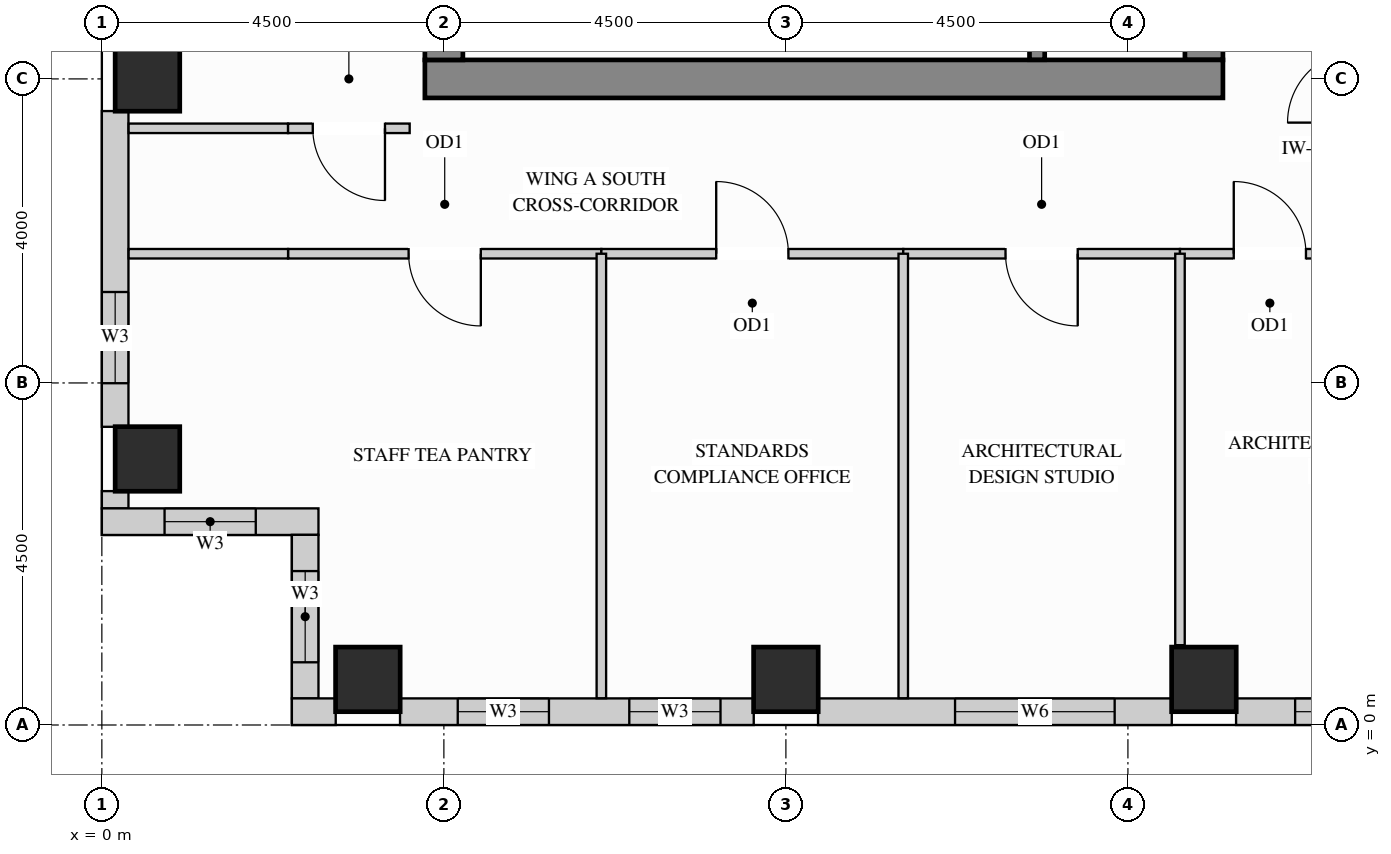
"""IFC4 building model, lengths in metres.
Left out: names, types, materials, properties, quantities, classifications, styles, units other than length and angle.
Written with IfcOpenShell. Run it as: python <this file> out.ifc"""

import sys

from ifc_helpers import new_model, si_unit, direction, frame, frame_2d, origin, origin_2d, place, context, subcontext, project, spatial, rectangle, extrude, source, transform, mapped, element, fill, save


model = new_model("IFC4")
c1 = context("Model", 3, precision=1e-05, world=origin(), true_north=direction((0.0, 1.0)))
c2 = subcontext(c1, "Body", "Model", "MODEL_VIEW")
j1 = project(units=[si_unit("LENGTHUNIT", "METRE"), si_unit("PLANEANGLEUNIT", "RADIAN")], contexts=[c1])
p1 = place(None, origin())
s1 = spatial("IfcSite", under=j1, at=p1, CompositionType="ELEMENT")
p2 = place(p1, origin())
s2 = spatial("IfcBuilding", under=s1, at=p2, CompositionType="ELEMENT")
p3 = place(p2, frame((0.0, 0.0, 241.2)))
s3 = spatial("IfcBuildingStorey", under=s2, at=p3, CompositionType="ELEMENT", Elevation=241.2)
m1 = source(origin(), c2, "Body", "SweptSolid", [
    extrude(rectangle(XDim=0.85, YDim=0.85, at=origin_2d()), origin(), (0.0, 0.0, 1.0), 3.4),
])
for number, where, z_axis, x_axis in (
    (1, (14.5, 0.6, 0.0), (0.0, 0.0, 1.0), (1.0, 0.0, 0.0)),
    (2, (3.5, 0.6, 0.0), (0.0, 0.0, 1.0), (1.0, 0.0, 0.0)),
    (3, (9.0, 0.6, 0.0), (0.0, 0.0, 1.0), (1.0, 0.0, 0.0)),
    (4, (0.6, 3.5, 0.0), (0.0, 0.0, 1.0), (1.0, 0.0, 0.0)),
    (5, (0.6, 8.5, 0.0), (0.0, 0.0, 1.0), (1.0, 0.0, 0.0)),
):
    element("IfcColumn", number, at=place(p3, frame(where, z_axis=z_axis, x_axis=x_axis)), inside=s3, PredefinedType="COLUMN", context=c2, shape_type="MappedRepresentation", body=[
        mapped(m1, transform((0.0, 0.0, 0.0), x_axis=(1.0, 0.0, 0.0), y_axis=(0.0, 1.0, 0.0), z_axis=(0.0, 0.0, 1.0))),
    ])
m2 = source(origin(), c2, "Body", "SweptSolid", [
    extrude(rectangle(XDim=10.07, YDim=0.5, at=frame_2d((5.035, 0.0))), origin(), (0.0, 0.0, 1.0), 3.4),
])
p4 = place(p3, frame((14.5, 8.75, 0.0), z_axis=(0.0, 0.0, 1.0), x_axis=(0.0, 1.0, 0.0)))
e6 = element("IfcWall", 6, at=p4, inside=s3, PredefinedType="SHEAR", context=c2, shape_type="MappedRepresentation", body=[
    mapped(m2, transform((0.0, 0.0, 0.0), x_axis=(1.0, 0.0, 0.0), y_axis=(0.0, 1.0, 0.0), z_axis=(0.0, 0.0, 1.0))),
])
m3 = source(origin(), c2, "Body", "SweptSolid", [
    extrude(rectangle(XDim=10.5, YDim=0.5, at=frame_2d((5.25, 0.0))), origin(), (0.0, 0.0, 1.0), 3.4),
])
p5 = place(p3, frame((4.25, 8.5, 0.0), z_axis=(0.0, 0.0, 1.0), x_axis=(1.0, 0.0, 0.0)))
e7 = element("IfcWall", 7, at=p5, inside=s3, PredefinedType="SHEAR", context=c2, shape_type="MappedRepresentation", body=[
    mapped(m3, transform((0.0, 0.0, 0.0), x_axis=(1.0, 0.0, 0.0), y_axis=(0.0, 1.0, 0.0), z_axis=(0.0, 0.0, 1.0))),
])
m4 = source(origin(), c2, "Body", "SweptSolid", [
    extrude(rectangle(XDim=20.5, YDim=0.5, at=frame_2d((10.25, 0.0))), origin(), (0.0, 0.0, 1.0), 3.4),
])
p6 = place(p3, frame((4.5, 8.75, 0.0), z_axis=(0.0, 0.0, 1.0), x_axis=(0.0, 1.0, 0.0)))
e8 = element("IfcWall", 8, at=p6, inside=s3, PredefinedType="SHEAR", context=c2, shape_type="MappedRepresentation", body=[
    mapped(m4, transform((0.0, 0.0, 0.0), x_axis=(1.0, 0.0, 0.0), y_axis=(0.0, 1.0, 0.0), z_axis=(0.0, 0.0, 1.0))),
])
p7 = place(p3, frame((0.175, 8.077, 0.0), z_axis=(0.0, 0.0, 1.0), x_axis=(0.0, -1.0, 0.0)))
e9 = element("IfcWall", 9, at=p7, inside=s3, PredefinedType="SOLIDWALL", context=c2, shape_type="SweptSolid", body=[
    extrude(rectangle(XDim=4.154, YDim=0.35, at=frame_2d((2.077, 0.0))), origin(), (0.0, 0.0, 1.0), 3.385),
])
p8 = place(p7, frame((2.381, 0.0, 0.78)))
e10 = element("IfcOpeningElement", 10, at=p8, cuts=e9, PredefinedType="OPENING", context=c2, shape_type="SweptSolid", body=[
    extrude(rectangle(XDim=1.2, YDim=2.25, at=frame_2d((0.6, 1.125))), frame((0.0, 0.185, 0.0), z_axis=(0.0, -1.0, 0.0), x_axis=(1.0, 0.0, 0.0)), (0.0, 0.0, 1.0), 0.37),
])
m5 = source(origin(), c2, "Body", "SweptSolid", [
    extrude(rectangle(XDim=0.229, YDim=0.35, at=frame_2d((0.115, 0.0))), origin(), (0.0, 0.0, 1.0), 3.385),
])
p9 = place(p3, frame((0.175, 3.077, 0.0), z_axis=(0.0, 0.0, 1.0), x_axis=(0.0, -1.0, 0.0)))
e11 = element("IfcWall", 11, at=p9, inside=s3, PredefinedType="SOLIDWALL", context=c2, shape_type="MappedRepresentation", body=[
    mapped(m5, transform((0.0, 0.0, 0.0), x_axis=(1.0, 0.0, 0.0), y_axis=(0.0, 1.0, 0.0), z_axis=(0.0, 0.0, 1.0))),
])
p10 = place(p3, frame((0.0, 2.675, 0.0), z_axis=(0.0, 0.0, 1.0), x_axis=(1.0, 0.0, 0.0)))
e12 = element("IfcWall", 12, at=p10, inside=s3, PredefinedType="SOLIDWALL", context=c2, shape_type="SweptSolid", body=[
    extrude(rectangle(XDim=2.85, YDim=0.35, at=frame_2d((1.425, 0.0))), origin(), (0.0, 0.0, 1.0), 3.385),
])
p11 = place(p10, frame((0.825, 0.0, 0.78)))
e13 = element("IfcOpeningElement", 13, at=p11, cuts=e12, PredefinedType="OPENING", context=c2, shape_type="SweptSolid", body=[
    extrude(rectangle(XDim=1.2, YDim=2.25, at=frame_2d((0.6, 1.125))), frame((0.0, 0.185, 0.0), z_axis=(0.0, -1.0, 0.0), x_axis=(1.0, 0.0, 0.0)), (0.0, 0.0, 1.0), 0.37),
])
p12 = place(p3, frame((2.675, 2.502, 0.0), z_axis=(0.0, 0.0, 1.0), x_axis=(0.0, -1.0, 0.0)))
e14 = element("IfcWall", 14, at=p12, inside=s3, PredefinedType="SOLIDWALL", context=c2, shape_type="SweptSolid", body=[
    extrude(rectangle(XDim=2.154, YDim=0.35, at=frame_2d((1.077, 0.0))), origin(), (0.0, 0.0, 1.0), 3.385),
])
p13 = place(p12, frame((0.477, 0.0, 0.78)))
e15 = element("IfcOpeningElement", 15, at=p13, cuts=e14, PredefinedType="OPENING", context=c2, shape_type="SweptSolid", body=[
    extrude(rectangle(XDim=1.2, YDim=2.25, at=frame_2d((0.6, 1.125))), frame((0.0, 0.185, 0.0), z_axis=(0.0, -1.0, 0.0), x_axis=(1.0, 0.0, 0.0)), (0.0, 0.0, 1.0), 0.37),
])
m6 = source(origin(), c2, "Body", "SweptSolid", [
    extrude(rectangle(XDim=0.577, YDim=0.35, at=frame_2d((0.289, 0.0))), origin(), (0.0, 0.0, 1.0), 3.385),
])
p14 = place(p3, frame((2.5, 0.175, 0.0), z_axis=(0.0, 0.0, 1.0), x_axis=(1.0, 0.0, 0.0)))
e16 = element("IfcWall", 16, at=p14, inside=s3, PredefinedType="SOLIDWALL", context=c2, shape_type="MappedRepresentation", body=[
    mapped(m6, transform((0.0, 0.0, 0.0), x_axis=(1.0, 0.0, 0.0), y_axis=(0.0, 1.0, 0.0), z_axis=(0.0, 0.0, 1.0))),
])
p15 = place(p3, frame((3.923, 0.175, 0.0), z_axis=(0.0, 0.0, 1.0), x_axis=(1.0, 0.0, 0.0)))
e17 = element("IfcWall", 17, at=p15, inside=s3, PredefinedType="SOLIDWALL", context=c2, shape_type="SweptSolid", body=[
    extrude(rectangle(XDim=4.654, YDim=0.35, at=frame_2d((2.327, 0.0))), origin(), (0.0, 0.0, 1.0), 3.385),
])
p16 = place(p15, frame((0.76, 0.0, 0.78)))
e18 = element("IfcOpeningElement", 18, at=p16, cuts=e17, PredefinedType="OPENING", context=c2, shape_type="SweptSolid", body=[
    extrude(rectangle(XDim=1.2, YDim=2.25, at=frame_2d((0.6, 1.125))), frame((0.0, 0.185, 0.0), z_axis=(0.0, -1.0, 0.0), x_axis=(1.0, 0.0, 0.0)), (0.0, 0.0, 1.0), 0.37),
])
p17 = place(p15, frame((3.017, 0.0, 0.78)))
e19 = element("IfcOpeningElement", 19, at=p17, cuts=e17, PredefinedType="OPENING", context=c2, shape_type="SweptSolid", body=[
    extrude(rectangle(XDim=1.2, YDim=2.25, at=frame_2d((0.6, 1.125))), frame((0.0, 0.185, 0.0), z_axis=(0.0, -1.0, 0.0), x_axis=(1.0, 0.0, 0.0)), (0.0, 0.0, 1.0), 0.37),
])
p18 = place(p3, frame((9.423, 0.175, 0.0), z_axis=(0.0, 0.0, 1.0), x_axis=(1.0, 0.0, 0.0)))
e20 = element("IfcWall", 20, at=p18, inside=s3, PredefinedType="SOLIDWALL", context=c2, shape_type="SweptSolid", body=[
    extrude(rectangle(XDim=4.654, YDim=0.35, at=frame_2d((2.327, 0.0))), origin(), (0.0, 0.0, 1.0), 3.385),
])
p19 = place(p18, frame((1.802, 0.0, 0.78)))
e21 = element("IfcOpeningElement", 21, at=p19, cuts=e20, PredefinedType="OPENING", context=c2, shape_type="SweptSolid", body=[
    extrude(rectangle(XDim=2.1, YDim=2.25, at=frame_2d((1.05, 1.125))), frame((0.0, 0.185, 0.0), z_axis=(0.0, -1.0, 0.0), x_axis=(1.0, 0.0, 0.0)), (0.0, 0.0, 1.0), 0.37),
])
p20 = place(p3, frame((14.923, 0.175, 0.0), z_axis=(0.0, 0.0, 1.0), x_axis=(1.0, 0.0, 0.0)))
e22 = element("IfcWall", 22, at=p20, inside=s3, PredefinedType="SOLIDWALL", context=c2, shape_type="SweptSolid", body=[
    extrude(rectangle(XDim=3.654, YDim=0.35, at=frame_2d((1.827, 0.0))), origin(), (0.0, 0.0, 1.0), 3.385),
])
p21 = place(p20, frame((0.777, 0.0, 0.78)))
e23 = element("IfcOpeningElement", 23, at=p21, cuts=e22, PredefinedType="OPENING", context=c2, shape_type="SweptSolid", body=[
    extrude(rectangle(XDim=2.1, YDim=2.25, at=frame_2d((1.05, 1.125))), frame((0.0, 0.185, 0.0), z_axis=(0.0, -1.0, 0.0), x_axis=(1.0, 0.0, 0.0)), (0.0, 0.0, 1.0), 0.37),
])
m7 = source(origin(), c2, "Body", "SweptSolid", [
    extrude(rectangle(XDim=2.098, YDim=0.125, at=frame_2d((1.049, 0.0))), origin(), (0.0, 0.0, 1.0), 3.385),
])
p22 = place(p3, frame((0.352, 7.85, 0.0), z_axis=(0.0, 0.0, 1.0), x_axis=(1.0, 0.0, 0.0)))
e24 = element("IfcWall", 24, at=p22, inside=s3, PredefinedType="PARTITIONING", context=c2, shape_type="MappedRepresentation", body=[
    mapped(m7, transform((0.0, 0.0, 0.0), x_axis=(1.0, 0.0, 0.0), y_axis=(0.0, 1.0, 0.0), z_axis=(0.0, 0.0, 1.0))),
])
p23 = place(p3, frame((2.45, 7.85, 0.0), z_axis=(0.0, 0.0, 1.0), x_axis=(1.0, 0.0, 0.0)))
e25 = element("IfcWall", 25, at=p23, inside=s3, PredefinedType="PARTITIONING", context=c2, shape_type="SweptSolid", body=[
    extrude(rectangle(XDim=1.6, YDim=0.125, at=frame_2d((0.8, 0.0))), origin(), (0.0, 0.0, 1.0), 3.385),
])
p24 = place(p23, frame((0.325, 0.0, 0.0)))
e26 = element("IfcOpeningElement", 26, at=p24, cuts=e25, PredefinedType="OPENING", context=c2, shape_type="SweptSolid", body=[
    extrude(rectangle(XDim=0.95, YDim=2.15, at=frame_2d((0.475, 1.075))), frame((0.0, 0.073, 0.0), z_axis=(0.0, -1.0, 0.0), x_axis=(1.0, 0.0, 0.0)), (0.0, 0.0, 1.0), 0.145),
])
p25 = place(p3, frame((2.45, 6.2, 0.0), z_axis=(0.0, 0.0, 1.0), x_axis=(1.0, 0.0, 0.0)))
e27 = element("IfcWall", 27, at=p25, inside=s3, PredefinedType="PARTITIONING", context=c2, shape_type="SweptSolid", body=[
    extrude(rectangle(XDim=4.122, YDim=0.125, at=frame_2d((2.061, 0.0))), origin(), (0.0, 0.0, 1.0), 2.848),
])
p26 = place(p25, frame((1.586, 0.0, 0.0)))
e28 = element("IfcOpeningElement", 28, at=p26, cuts=e27, PredefinedType="OPENING", context=c2, shape_type="SweptSolid", body=[
    extrude(rectangle(XDim=0.95, YDim=2.15, at=frame_2d((0.475, 1.075))), frame((0.0, 0.073, 0.0), z_axis=(0.0, -1.0, 0.0), x_axis=(1.0, 0.0, 0.0)), (0.0, 0.0, 1.0), 0.145),
])
p27 = place(p3, frame((6.572, 6.2, 0.0), z_axis=(0.0, 0.0, 1.0), x_axis=(1.0, 0.0, 0.0)))
e29 = element("IfcWall", 29, at=p27, inside=s3, PredefinedType="PARTITIONING", context=c2, shape_type="SweptSolid", body=[
    extrude(rectangle(XDim=3.972, YDim=0.125, at=frame_2d((1.986, 0.0))), origin(), (0.0, 0.0, 1.0), 2.848),
])
p28 = place(p27, frame((1.511, 0.0, 0.0)))
e30 = element("IfcOpeningElement", 30, at=p28, cuts=e29, PredefinedType="OPENING", context=c2, shape_type="SweptSolid", body=[
    extrude(rectangle(XDim=0.95, YDim=2.15, at=frame_2d((0.475, 1.075))), frame((0.0, 0.073, 0.0), z_axis=(0.0, -1.0, 0.0), x_axis=(1.0, 0.0, 0.0)), (0.0, 0.0, 1.0), 0.145),
])
p29 = place(p3, frame((10.544, 6.2, 0.0), z_axis=(0.0, 0.0, 1.0), x_axis=(1.0, 0.0, 0.0)))
e31 = element("IfcWall", 31, at=p29, inside=s3, PredefinedType="PARTITIONING", context=c2, shape_type="SweptSolid", body=[
    extrude(rectangle(XDim=3.641, YDim=0.125, at=frame_2d((1.821, 0.0))), origin(), (0.0, 0.0, 1.0), 2.848),
])
p30 = place(p29, frame((1.345, 0.0, 0.0)))
e32 = element("IfcOpeningElement", 32, at=p30, cuts=e31, PredefinedType="OPENING", context=c2, shape_type="SweptSolid", body=[
    extrude(rectangle(XDim=0.95, YDim=2.15, at=frame_2d((0.475, 1.075))), frame((0.0, 0.073, 0.0), z_axis=(0.0, -1.0, 0.0), x_axis=(1.0, 0.0, 0.0)), (0.0, 0.0, 1.0), 0.145),
])
p31 = place(p3, frame((14.185, 6.2, 0.0), z_axis=(0.0, 0.0, 1.0), x_axis=(1.0, 0.0, 0.0)))
e33 = element("IfcWall", 33, at=p31, inside=s3, PredefinedType="PARTITIONING", context=c2, shape_type="SweptSolid", body=[
    extrude(rectangle(XDim=2.365, YDim=0.125, at=frame_2d((1.183, 0.0))), origin(), (0.0, 0.0, 1.0), 2.848),
])
p32 = place(p31, frame((0.708, 0.0, 0.0)))
e34 = element("IfcOpeningElement", 34, at=p32, cuts=e33, PredefinedType="OPENING", context=c2, shape_type="SweptSolid", body=[
    extrude(rectangle(XDim=0.95, YDim=2.15, at=frame_2d((0.475, 1.075))), frame((0.0, 0.073, 0.0), z_axis=(0.0, -1.0, 0.0), x_axis=(1.0, 0.0, 0.0)), (0.0, 0.0, 1.0), 0.145),
])
m8 = source(origin(), c2, "Body", "SweptSolid", [
    extrude(rectangle(XDim=2.098, YDim=0.125, at=frame_2d((1.049, 0.0))), origin(), (0.0, 0.0, 1.0), 2.848),
])
p33 = place(p3, frame((0.352, 6.2, 0.0), z_axis=(0.0, 0.0, 1.0), x_axis=(1.0, 0.0, 0.0)))
e35 = element("IfcWall", 35, at=p33, inside=s3, PredefinedType="PARTITIONING", context=c2, shape_type="MappedRepresentation", body=[
    mapped(m8, transform((0.0, 0.0, 0.0), x_axis=(1.0, 0.0, 0.0), y_axis=(0.0, 1.0, 0.0), z_axis=(0.0, 0.0, 1.0))),
])
m9 = source(origin(), c2, "Body", "SweptSolid", [
    extrude(rectangle(XDim=5.848, YDim=0.125, at=frame_2d((2.924, 0.0))), origin(), (0.0, 0.0, 1.0), 3.385),
])
for number, where, z_axis, x_axis in (
    (36, (6.572, 0.352, 0.0), (0.0, 0.0, 1.0), (0.0, 1.0, 0.0)),
    (37, (10.544, 0.352, 0.0), (0.0, 0.0, 1.0), (0.0, 1.0, 0.0)),
):
    element("IfcWall", number, at=place(p3, frame(where, z_axis=z_axis, x_axis=x_axis)), inside=s3, PredefinedType="PARTITIONING", context=c2, shape_type="MappedRepresentation", body=[
        mapped(m9, transform((0.0, 0.0, 0.0), x_axis=(1.0, 0.0, 0.0), y_axis=(0.0, 1.0, 0.0), z_axis=(0.0, 0.0, 1.0))),
    ])
m10 = source(origin(), c2, "Body", "SweptSolid", [
    extrude(rectangle(XDim=5.15, YDim=0.125, at=frame_2d((2.575, 0.0))), origin(), (0.0, 0.0, 1.0), 3.385),
])
p34 = place(p3, frame((14.185, 1.05, 0.0), z_axis=(0.0, 0.0, 1.0), x_axis=(0.0, 1.0, 0.0)))
e38 = element("IfcWall", 38, at=p34, inside=s3, PredefinedType="PARTITIONING", context=c2, shape_type="MappedRepresentation", body=[
    mapped(m10, transform((0.0, 0.0, 0.0), x_axis=(1.0, 0.0, 0.0), y_axis=(0.0, 1.0, 0.0), z_axis=(0.0, 0.0, 1.0))),
])
m11 = source(origin(), c2, "Body", "SweptSolid", [
    extrude(rectangle(XDim=3.803, YDim=0.2, at=frame_2d((1.901, 0.0))), origin(), (0.0, 0.0, 1.0), 3.4),
])
p35 = place(p3, frame((12.305, 8.752, 0.0), z_axis=(0.0, 0.0, 1.0), x_axis=(0.0, 1.0, 0.0)))
e39 = element("IfcWall", 39, at=p35, inside=s3, PredefinedType="SHEAR", context=c2, shape_type="MappedRepresentation", body=[
    mapped(m11, transform((0.0, 0.0, 0.0), x_axis=(1.0, 0.0, 0.0), y_axis=(0.0, 1.0, 0.0), z_axis=(0.0, 0.0, 1.0))),
])
m12 = source(origin(), c2, "Body", "SweptSolid", [
    extrude(rectangle(XDim=0.95, YDim=2.15, at=frame_2d((0.475, 1.075))), frame((0.0, 0.025, 0.0), z_axis=(0.0, -1.0, 0.0), x_axis=(1.0, 0.0, 0.0)), (0.0, 0.0, 1.0), 0.05),
])
p36 = place(p26, origin())
e40 = element("IfcDoor", 40, at=p36, inside=s3, OperationType="SINGLE_SWING_RIGHT", PredefinedType="DOOR", context=c2, shape_type="MappedRepresentation", body=[
    mapped(m12, transform((0.0, 0.0, 0.0), x_axis=(1.0, 0.0, 0.0), y_axis=(0.0, 1.0, 0.0), z_axis=(0.0, 0.0, 1.0))),
])
fill(e28, e40)
p37 = place(p28, origin())
e41 = element("IfcDoor", 41, at=p37, inside=s3, OperationType="SINGLE_SWING_LEFT", PredefinedType="DOOR", context=c2, shape_type="MappedRepresentation", body=[
    mapped(m12, transform((0.0, 0.0, 0.0), x_axis=(1.0, 0.0, 0.0), y_axis=(0.0, 1.0, 0.0), z_axis=(0.0, 0.0, 1.0))),
])
fill(e30, e41)
p38 = place(p30, origin())
e42 = element("IfcDoor", 42, at=p38, inside=s3, OperationType="SINGLE_SWING_RIGHT", PredefinedType="DOOR", context=c2, shape_type="MappedRepresentation", body=[
    mapped(m12, transform((0.0, 0.0, 0.0), x_axis=(1.0, 0.0, 0.0), y_axis=(0.0, 1.0, 0.0), z_axis=(0.0, 0.0, 1.0))),
])
fill(e32, e42)
p39 = place(p32, origin())
e43 = element("IfcDoor", 43, at=p39, inside=s3, OperationType="SINGLE_SWING_LEFT", PredefinedType="DOOR", context=c2, shape_type="MappedRepresentation", body=[
    mapped(m12, transform((0.0, 0.0, 0.0), x_axis=(1.0, 0.0, 0.0), y_axis=(0.0, 1.0, 0.0), z_axis=(0.0, 0.0, 1.0))),
])
fill(e34, e43)
p40 = place(p24, origin())
e44 = element("IfcDoor", 44, at=p40, inside=s3, OperationType="SINGLE_SWING_RIGHT", PredefinedType="DOOR", context=c2, shape_type="MappedRepresentation", body=[
    mapped(m12, transform((0.0, 0.0, 0.0), x_axis=(1.0, 0.0, 0.0), y_axis=(0.0, 1.0, 0.0), z_axis=(0.0, 0.0, 1.0))),
])
fill(e26, e44)
m13 = source(origin(), c2, "Body", "SweptSolid", [
    extrude(rectangle(XDim=1.2, YDim=2.25, at=frame_2d((0.6, 1.125))), frame((0.0, 0.03, 0.0), z_axis=(0.0, -1.0, 0.0), x_axis=(1.0, 0.0, 0.0)), (0.0, 0.0, 1.0), 0.06),
])
p41 = place(p8, origin())
e45 = element("IfcWindow", 45, at=p41, inside=s3, PartitioningType="SINGLE_PANEL", PredefinedType="WINDOW", context=c2, shape_type="MappedRepresentation", body=[
    mapped(m13, transform((0.0, 0.0, 0.0), x_axis=(1.0, 0.0, 0.0), y_axis=(0.0, 1.0, 0.0), z_axis=(0.0, 0.0, 1.0))),
])
fill(e10, e45)
p42 = place(p11, origin())
e46 = element("IfcWindow", 46, at=p42, inside=s3, PartitioningType="SINGLE_PANEL", PredefinedType="WINDOW", context=c2, shape_type="MappedRepresentation", body=[
    mapped(m13, transform((0.0, 0.0, 0.0), x_axis=(1.0, 0.0, 0.0), y_axis=(0.0, 1.0, 0.0), z_axis=(0.0, 0.0, 1.0))),
])
fill(e13, e46)
p43 = place(p13, origin())
e47 = element("IfcWindow", 47, at=p43, inside=s3, PartitioningType="SINGLE_PANEL", PredefinedType="WINDOW", context=c2, shape_type="MappedRepresentation", body=[
    mapped(m13, transform((0.0, 0.0, 0.0), x_axis=(1.0, 0.0, 0.0), y_axis=(0.0, 1.0, 0.0), z_axis=(0.0, 0.0, 1.0))),
])
fill(e15, e47)
p44 = place(p16, origin())
e48 = element("IfcWindow", 48, at=p44, inside=s3, PartitioningType="SINGLE_PANEL", PredefinedType="WINDOW", context=c2, shape_type="MappedRepresentation", body=[
    mapped(m13, transform((0.0, 0.0, 0.0), x_axis=(1.0, 0.0, 0.0), y_axis=(0.0, 1.0, 0.0), z_axis=(0.0, 0.0, 1.0))),
])
fill(e18, e48)
p45 = place(p17, origin())
e49 = element("IfcWindow", 49, at=p45, inside=s3, PartitioningType="SINGLE_PANEL", PredefinedType="WINDOW", context=c2, shape_type="MappedRepresentation", body=[
    mapped(m13, transform((0.0, 0.0, 0.0), x_axis=(1.0, 0.0, 0.0), y_axis=(0.0, 1.0, 0.0), z_axis=(0.0, 0.0, 1.0))),
])
fill(e19, e49)
m14 = source(origin(), c2, "Body", "SweptSolid", [
    extrude(rectangle(XDim=2.1, YDim=2.25, at=frame_2d((1.05, 1.125))), frame((0.0, 0.03, 0.0), z_axis=(0.0, -1.0, 0.0), x_axis=(1.0, 0.0, 0.0)), (0.0, 0.0, 1.0), 0.06),
])
p46 = place(p19, origin())
e50 = element("IfcWindow", 50, at=p46, inside=s3, PartitioningType="SINGLE_PANEL", PredefinedType="WINDOW", context=c2, shape_type="MappedRepresentation", body=[
    mapped(m14, transform((0.0, 0.0, 0.0), x_axis=(1.0, 0.0, 0.0), y_axis=(0.0, 1.0, 0.0), z_axis=(0.0, 0.0, 1.0))),
])
fill(e21, e50)
p47 = place(p21, origin())
e51 = element("IfcWindow", 51, at=p47, inside=s3, PartitioningType="SINGLE_PANEL", PredefinedType="WINDOW", context=c2, shape_type="MappedRepresentation", body=[
    mapped(m14, transform((0.0, 0.0, 0.0), x_axis=(1.0, 0.0, 0.0), y_axis=(0.0, 1.0, 0.0), z_axis=(0.0, 0.0, 1.0))),
])
fill(e23, e51)
save(model, sys.argv[1])
